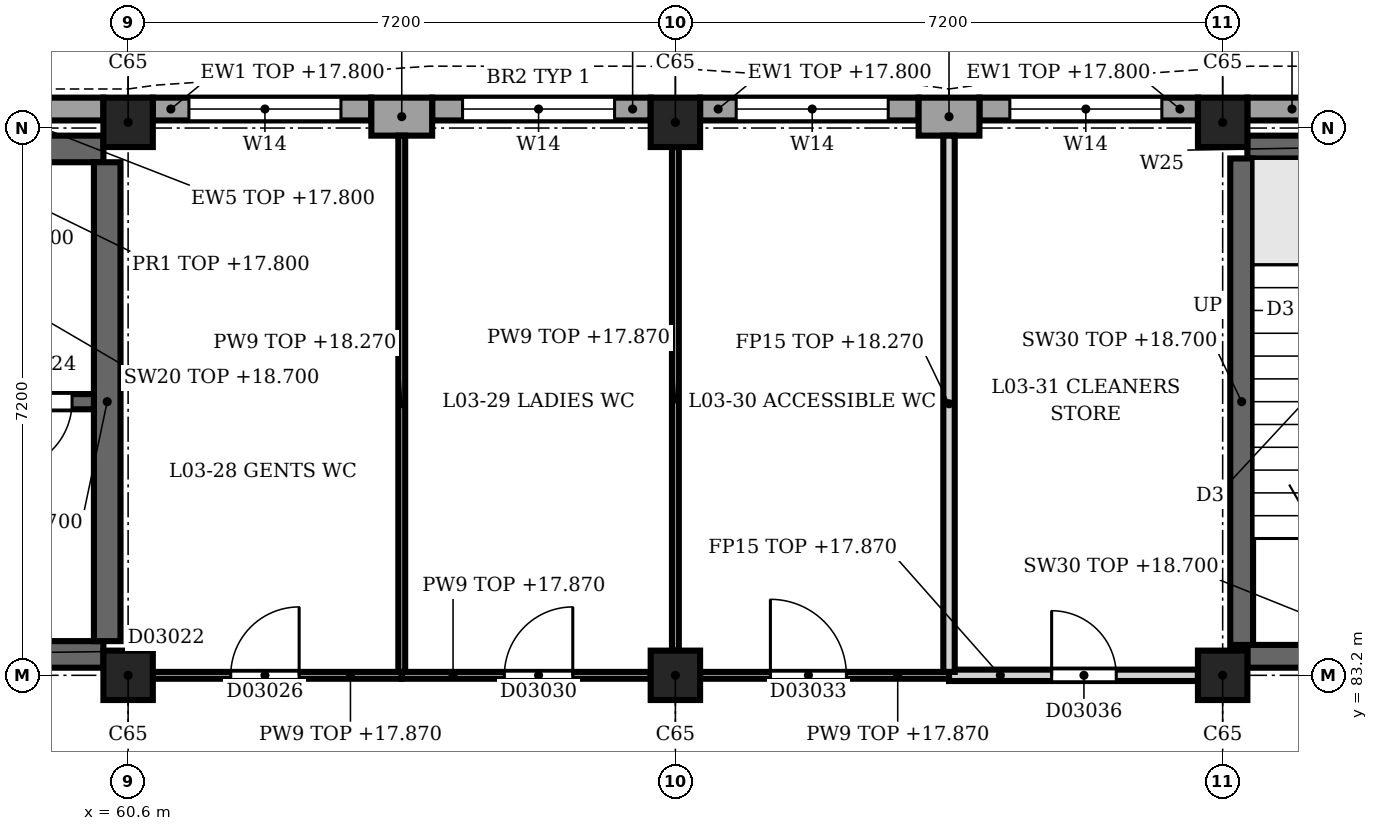
"""IFC4 building model, lengths in metres.
Left out: names, types, materials, properties, quantities, classifications, styles, units other than length and angle.
Written with IfcOpenShell. Run it as: python <this file> out.ifc"""

import sys

from ifc_helpers import new_model, si_unit, direction, frame, frame_2d, origin, origin_2d, place, context, subcontext, project, spatial, rectangle, extrude, element, fill, save


model = new_model("IFC4")
c1 = context("Model", 3, precision=1e-05, world=origin(), true_north=direction((0.0, 1.0)))
c2 = subcontext(c1, "Body", "Model", "MODEL_VIEW")
j1 = project(units=[si_unit("LENGTHUNIT", "METRE"), si_unit("PLANEANGLEUNIT", "RADIAN")], contexts=[c1])
p1 = place(None, origin())
s1 = spatial("IfcSite", under=j1, at=p1, CompositionType="ELEMENT")
p2 = place(p1, origin())
s2 = spatial("IfcBuilding", under=s1, at=p2, CompositionType="ELEMENT")
p3 = place(p2, frame((0.0, 0.0, 14.4)))
s3 = spatial("IfcBuildingStorey", under=s2, at=p3, CompositionType="ELEMENT", Elevation=14.4)
for number, where, z_axis, x_axis in (
    (1, (60.6, 83.2, 0.0), (0.0, 0.0, 1.0), (1.0, 0.0, 0.0)),
    (2, (60.6, 90.475, 0.0), (0.0, 0.0, 1.0), (1.0, 0.0, 0.0)),
    (3, (67.8, 83.2, 0.0), (0.0, 0.0, 1.0), (1.0, 0.0, 0.0)),
    (4, (67.8, 90.475, 0.0), (0.0, 0.0, 1.0), (1.0, 0.0, 0.0)),
    (5, (75.0, 83.2, 0.0), (0.0, 0.0, 1.0), (1.0, 0.0, 0.0)),
    (6, (75.0, 90.475, 0.0), (0.0, 0.0, 1.0), (1.0, 0.0, 0.0)),
):
    element("IfcColumn", number, at=place(p3, frame(where, z_axis=z_axis, x_axis=x_axis)), inside=s3, PredefinedType="COLUMN", context=c2, shape_type="SweptSolid", body=[
        extrude(rectangle(XDim=0.65, YDim=0.65, at=origin_2d()), origin(), (0.0, 0.0, 1.0), 4.5),
    ])
for number, where, z_axis, x_axis in (
    (7, (63.8, 90.55, 0.0), (0.0, 0.0, 1.0), (1.0, 0.0, 0.0)),
    (8, (71.0, 90.55, 0.0), (0.0, 0.0, 1.0), (1.0, 0.0, 0.0)),
):
    element("IfcWall", number, at=place(p3, frame(where, z_axis=z_axis, x_axis=x_axis)), inside=s3, PredefinedType="SOLIDWALL", context=c2, shape_type="SweptSolid", body=[
        extrude(rectangle(XDim=0.8, YDim=0.5, at=frame_2d((0.4, 0.0))), origin(), (0.0, 0.0, 1.0), 3.4),
    ])
p4 = place(p3, frame((57.4, 90.65, 0.0), z_axis=(0.0, 0.0, 1.0), x_axis=(1.0, 0.0, 0.0)))
e9 = element("IfcWall", 9, at=p4, inside=s3, PredefinedType="SOLIDWALL", context=c2, shape_type="SweptSolid", body=[
    extrude(rectangle(XDim=2.875, YDim=0.3, at=frame_2d((1.438, 0.0))), origin(), (0.0, 0.0, 1.0), 3.4),
])
p5 = place(p3, frame((60.925, 90.65, 0.0), z_axis=(0.0, 0.0, 1.0), x_axis=(1.0, 0.0, 0.0)))
e10 = element("IfcWall", 10, at=p5, inside=s3, PredefinedType="SOLIDWALL", context=c2, shape_type="SweptSolid", body=[
    extrude(rectangle(XDim=2.875, YDim=0.3, at=frame_2d((1.438, 0.0))), origin(), (0.0, 0.0, 1.0), 3.4),
])
p6 = place(p5, frame((0.475, 0.0, 0.9)))
e11 = element("IfcOpeningElement", 11, at=p6, cuts=e10, PredefinedType="OPENING", context=c2, shape_type="SweptSolid", body=[
    extrude(rectangle(XDim=2.0, YDim=2.4, at=frame_2d((1.0, 1.2))), frame((0.0, 0.16, 0.0), z_axis=(0.0, -1.0, 0.0), x_axis=(1.0, 0.0, 0.0)), (0.0, 0.0, 1.0), 0.32),
])
p7 = place(p3, frame((64.6, 90.65, 0.0), z_axis=(0.0, 0.0, 1.0), x_axis=(1.0, 0.0, 0.0)))
e12 = element("IfcWall", 12, at=p7, inside=s3, PredefinedType="SOLIDWALL", context=c2, shape_type="SweptSolid", body=[
    extrude(rectangle(XDim=2.875, YDim=0.3, at=frame_2d((1.438, 0.0))), origin(), (0.0, 0.0, 1.0), 3.4),
])
p8 = place(p7, frame((0.4, 0.0, 0.9)))
e13 = element("IfcOpeningElement", 13, at=p8, cuts=e12, PredefinedType="OPENING", context=c2, shape_type="SweptSolid", body=[
    extrude(rectangle(XDim=2.0, YDim=2.4, at=frame_2d((1.0, 1.2))), frame((0.0, 0.16, 0.0), z_axis=(0.0, -1.0, 0.0), x_axis=(1.0, 0.0, 0.0)), (0.0, 0.0, 1.0), 0.32),
])
p9 = place(p3, frame((68.125, 90.65, 0.0), z_axis=(0.0, 0.0, 1.0), x_axis=(1.0, 0.0, 0.0)))
e14 = element("IfcWall", 14, at=p9, inside=s3, PredefinedType="SOLIDWALL", context=c2, shape_type="SweptSolid", body=[
    extrude(rectangle(XDim=2.875, YDim=0.3, at=frame_2d((1.438, 0.0))), origin(), (0.0, 0.0, 1.0), 3.4),
])
p10 = place(p9, frame((0.475, 0.0, 0.9)))
e15 = element("IfcOpeningElement", 15, at=p10, cuts=e14, PredefinedType="OPENING", context=c2, shape_type="SweptSolid", body=[
    extrude(rectangle(XDim=2.0, YDim=2.4, at=frame_2d((1.0, 1.2))), frame((0.0, 0.16, 0.0), z_axis=(0.0, -1.0, 0.0), x_axis=(1.0, 0.0, 0.0)), (0.0, 0.0, 1.0), 0.32),
])
p11 = place(p3, frame((71.8, 90.65, 0.0), z_axis=(0.0, 0.0, 1.0), x_axis=(1.0, 0.0, 0.0)))
e16 = element("IfcWall", 16, at=p11, inside=s3, PredefinedType="SOLIDWALL", context=c2, shape_type="SweptSolid", body=[
    extrude(rectangle(XDim=2.875, YDim=0.3, at=frame_2d((1.438, 0.0))), origin(), (0.0, 0.0, 1.0), 3.4),
])
p12 = place(p11, frame((0.4, 0.0, 0.9)))
e17 = element("IfcOpeningElement", 17, at=p12, cuts=e16, PredefinedType="OPENING", context=c2, shape_type="SweptSolid", body=[
    extrude(rectangle(XDim=2.0, YDim=2.4, at=frame_2d((1.0, 1.2))), frame((0.0, 0.16, 0.0), z_axis=(0.0, -1.0, 0.0), x_axis=(1.0, 0.0, 0.0)), (0.0, 0.0, 1.0), 0.32),
])
p13 = place(p3, frame((75.325, 90.65, 0.0), z_axis=(0.0, 0.0, 1.0), x_axis=(1.0, 0.0, 0.0)))
e18 = element("IfcWall", 18, at=p13, inside=s3, PredefinedType="SOLIDWALL", context=c2, shape_type="SweptSolid", body=[
    extrude(rectangle(XDim=2.875, YDim=0.3, at=frame_2d((1.438, 0.0))), origin(), (0.0, 0.0, 1.0), 3.4),
])
p14 = place(p13, frame((1.175, 0.0, 1.2)))
e19 = element("IfcOpeningElement", 19, at=p14, cuts=e18, PredefinedType="OPENING", context=c2, shape_type="SweptSolid", body=[
    extrude(rectangle(XDim=0.6, YDim=1.8, at=frame_2d((0.3, 0.9))), frame((0.0, 0.16, 0.0), z_axis=(0.0, -1.0, 0.0), x_axis=(1.0, 0.0, 0.0)), (0.0, 0.0, 1.0), 0.32),
])
p15 = place(p3, frame((53.725, 83.475, 0.0), z_axis=(0.0, 0.0, 1.0), x_axis=(1.0, 0.0, 0.0)))
e20 = element("IfcWall", 20, at=p15, inside=s3, PredefinedType="SHEAR", context=c2, shape_type="SweptSolid", body=[
    extrude(rectangle(XDim=6.55, YDim=0.35, at=frame_2d((3.275, 0.0))), origin(), (0.0, 0.0, 1.0), 4.3),
])
p16 = place(p15, frame((2.675, 0.0, 0.0)))
e21 = element("IfcOpeningElement", 21, at=p16, cuts=e20, PredefinedType="OPENING", context=c2, shape_type="SweptSolid", body=[
    extrude(rectangle(XDim=1.8, YDim=2.1, at=frame_2d((0.9, 1.05))), frame((0.0, 0.185, 0.0), z_axis=(0.0, -1.0, 0.0), x_axis=(1.0, 0.0, 0.0)), (0.0, 0.0, 1.0), 0.37),
])
p17 = place(p3, frame((53.725, 90.125, 0.0), z_axis=(0.0, 0.0, 1.0), x_axis=(1.0, 0.0, 0.0)))
e22 = element("IfcWall", 22, at=p17, inside=s3, PredefinedType="SHEAR", context=c2, shape_type="SweptSolid", body=[
    extrude(rectangle(XDim=6.55, YDim=0.35, at=frame_2d((3.275, 0.0))), origin(), (0.0, 0.0, 1.0), 4.3),
])
p18 = place(p3, frame((60.325, 83.65, 0.0), z_axis=(0.0, 0.0, 1.0), x_axis=(0.0, 1.0, 0.0)))
e23 = element("IfcWall", 23, at=p18, inside=s3, PredefinedType="SHEAR", context=c2, shape_type="SweptSolid", body=[
    extrude(rectangle(XDim=6.3, YDim=0.35, at=frame_2d((3.15, 0.0))), origin(), (0.0, 0.0, 1.0), 4.3),
])
p19 = place(p3, frame((60.15, 86.8, 0.0), z_axis=(0.0, 0.0, 1.0), x_axis=(-1.0, 0.0, 0.0)))
e24 = element("IfcWall", 24, at=p19, inside=s3, PredefinedType="SHEAR", context=c2, shape_type="SweptSolid", body=[
    extrude(rectangle(XDim=10.35, YDim=0.2, at=frame_2d((5.175, 0.0))), origin(), (0.0, 0.0, 1.0), 4.3),
])
p20 = place(p19, frame((8.8, 0.0, 0.0)))
e25 = element("IfcOpeningElement", 25, at=p20, cuts=e24, PredefinedType="OPENING", context=c2, shape_type="SweptSolid", body=[
    extrude(rectangle(XDim=1.1, YDim=2.1, at=frame_2d((0.55, 1.05))), frame((0.0, 0.11, 0.0), z_axis=(0.0, -1.0, 0.0), x_axis=(1.0, 0.0, 0.0)), (0.0, 0.0, 1.0), 0.22),
])
p21 = place(p19, frame((6.6, 0.0, 0.0)))
e26 = element("IfcOpeningElement", 26, at=p21, cuts=e24, PredefinedType="OPENING", context=c2, shape_type="SweptSolid", body=[
    extrude(rectangle(XDim=1.1, YDim=2.1, at=frame_2d((0.55, 1.05))), frame((0.0, 0.11, 0.0), z_axis=(0.0, -1.0, 0.0), x_axis=(1.0, 0.0, 0.0)), (0.0, 0.0, 1.0), 0.22),
])
p22 = place(p19, frame((3.75, 0.0, 0.0)))
e27 = element("IfcOpeningElement", 27, at=p22, cuts=e24, PredefinedType="OPENING", context=c2, shape_type="SweptSolid", body=[
    extrude(rectangle(XDim=1.4, YDim=2.1, at=frame_2d((0.7, 1.05))), frame((0.0, 0.11, 0.0), z_axis=(0.0, -1.0, 0.0), x_axis=(1.0, 0.0, 0.0)), (0.0, 0.0, 1.0), 0.22),
])
p23 = place(p19, frame((1.962, 0.0, 0.0)))
e28 = element("IfcOpeningElement", 28, at=p23, cuts=e24, PredefinedType="OPENING", context=c2, shape_type="SweptSolid", body=[
    extrude(rectangle(XDim=0.9, YDim=2.1, at=frame_2d((0.45, 1.05))), frame((0.0, 0.11, 0.0), z_axis=(0.0, -1.0, 0.0), x_axis=(1.0, 0.0, 0.0)), (0.0, 0.0, 1.0), 0.22),
])
p24 = place(p19, frame((0.288, 0.0, 0.0)))
e29 = element("IfcOpeningElement", 29, at=p24, cuts=e24, PredefinedType="OPENING", context=c2, shape_type="SweptSolid", body=[
    extrude(rectangle(XDim=0.9, YDim=2.1, at=frame_2d((0.45, 1.05))), frame((0.0, 0.11, 0.0), z_axis=(0.0, -1.0, 0.0), x_axis=(1.0, 0.0, 0.0)), (0.0, 0.0, 1.0), 0.22),
])
p25 = place(p3, frame((75.325, 83.45, 0.0), z_axis=(0.0, 0.0, 1.0), x_axis=(1.0, 0.0, 0.0)))
e30 = element("IfcWall", 30, at=p25, inside=s3, PredefinedType="SHEAR", context=c2, shape_type="SweptSolid", body=[
    extrude(rectangle(XDim=6.625, YDim=0.3, at=frame_2d((3.312, 0.0))), origin(), (0.0, 0.0, 1.0), 4.3),
])
p26 = place(p25, frame((4.275, 0.0, 0.0)))
e31 = element("IfcOpeningElement", 31, at=p26, cuts=e30, PredefinedType="OPENING", context=c2, shape_type="SweptSolid", body=[
    extrude(rectangle(XDim=1.2, YDim=2.1, at=frame_2d((0.6, 1.05))), frame((0.0, 0.16, 0.0), z_axis=(0.0, -1.0, 0.0), x_axis=(1.0, 0.0, 0.0)), (0.0, 0.0, 1.0), 0.32),
])
p27 = place(p3, frame((75.325, 90.15, 0.0), z_axis=(0.0, 0.0, 1.0), x_axis=(1.0, 0.0, 0.0)))
e32 = element("IfcWall", 32, at=p27, inside=s3, PredefinedType="SHEAR", context=c2, shape_type="SweptSolid", body=[
    extrude(rectangle(XDim=6.625, YDim=0.3, at=frame_2d((3.312, 0.0))), origin(), (0.0, 0.0, 1.0), 4.3),
])
p28 = place(p27, frame((1.175, 0.0, 1.2)))
e33 = element("IfcOpeningElement", 33, at=p28, cuts=e32, PredefinedType="OPENING", context=c2, shape_type="SweptSolid", body=[
    extrude(rectangle(XDim=0.6, YDim=1.8, at=frame_2d((0.3, 0.9))), frame((0.0, 0.16, 0.0), z_axis=(0.0, -1.0, 0.0), x_axis=(1.0, 0.0, 0.0)), (0.0, 0.0, 1.0), 0.32),
])
p29 = place(p3, frame((75.25, 83.6, 0.0), z_axis=(0.0, 0.0, 1.0), x_axis=(0.0, 1.0, 0.0)))
e34 = element("IfcWall", 34, at=p29, inside=s3, PredefinedType="SHEAR", context=c2, shape_type="SweptSolid", body=[
    extrude(rectangle(XDim=6.4, YDim=0.3, at=frame_2d((3.2, 0.0))), origin(), (0.0, 0.0, 1.0), 4.3),
])
p30 = place(p3, frame((60.925, 83.2, 0.0), z_axis=(0.0, 0.0, 1.0), x_axis=(1.0, 0.0, 0.0)))
e35 = element("IfcWall", 35, at=p30, inside=s3, PredefinedType="PARTITIONING", context=c2, shape_type="SweptSolid", body=[
    extrude(rectangle(XDim=3.275, YDim=0.09, at=frame_2d((1.637, 0.0))), origin(), (0.0, 0.0, 1.0), 3.47),
])
p31 = place(p30, frame((1.025, 0.0, 0.0)))
e36 = element("IfcOpeningElement", 36, at=p31, cuts=e35, PredefinedType="OPENING", context=c2, shape_type="SweptSolid", body=[
    extrude(rectangle(XDim=0.9, YDim=2.1, at=frame_2d((0.45, 1.05))), frame((0.0, 0.055, 0.0), z_axis=(0.0, -1.0, 0.0), x_axis=(1.0, 0.0, 0.0)), (0.0, 0.0, 1.0), 0.11),
])
p32 = place(p3, frame((64.2, 83.2, 0.0), z_axis=(0.0, 0.0, 1.0), x_axis=(1.0, 0.0, 0.0)))
e37 = element("IfcWall", 37, at=p32, inside=s3, PredefinedType="PARTITIONING", context=c2, shape_type="SweptSolid", body=[
    extrude(rectangle(XDim=3.275, YDim=0.09, at=frame_2d((1.638, 0.0))), origin(), (0.0, 0.0, 1.0), 3.47),
])
p33 = place(p32, frame((1.35, 0.0, 0.0)))
e38 = element("IfcOpeningElement", 38, at=p33, cuts=e37, PredefinedType="OPENING", context=c2, shape_type="SweptSolid", body=[
    extrude(rectangle(XDim=0.9, YDim=2.1, at=frame_2d((0.45, 1.05))), frame((0.0, 0.055, 0.0), z_axis=(0.0, -1.0, 0.0), x_axis=(1.0, 0.0, 0.0)), (0.0, 0.0, 1.0), 0.11),
])
p34 = place(p3, frame((68.125, 83.2, 0.0), z_axis=(0.0, 0.0, 1.0), x_axis=(1.0, 0.0, 0.0)))
e39 = element("IfcWall", 39, at=p34, inside=s3, PredefinedType="PARTITIONING", context=c2, shape_type="SweptSolid", body=[
    extrude(rectangle(XDim=3.275, YDim=0.09, at=frame_2d((1.637, 0.0))), origin(), (0.0, 0.0, 1.0), 3.47),
])
p35 = place(p34, frame((0.925, 0.0, 0.0)))
e40 = element("IfcOpeningElement", 40, at=p35, cuts=e39, PredefinedType="OPENING", context=c2, shape_type="SweptSolid", body=[
    extrude(rectangle(XDim=1.0, YDim=2.2, at=frame_2d((0.5, 1.1))), frame((0.0, 0.055, 0.0), z_axis=(0.0, -1.0, 0.0), x_axis=(1.0, 0.0, 0.0)), (0.0, 0.0, 1.0), 0.11),
])
p36 = place(p3, frame((71.4, 83.2, 0.0), z_axis=(0.0, 0.0, 1.0), x_axis=(1.0, 0.0, 0.0)))
e41 = element("IfcWall", 41, at=p36, inside=s3, PredefinedType="PARTITIONING", context=c2, shape_type="SweptSolid", body=[
    extrude(rectangle(XDim=3.275, YDim=0.15, at=frame_2d((1.638, 0.0))), origin(), (0.0, 0.0, 1.0), 3.47),
])
p37 = place(p36, frame((1.35, 0.0, 0.0)))
e42 = element("IfcOpeningElement", 42, at=p37, cuts=e41, PredefinedType="OPENING", context=c2, shape_type="SweptSolid", body=[
    extrude(rectangle(XDim=0.85, YDim=2.1, at=frame_2d((0.425, 1.05))), frame((0.0, 0.085, 0.0), z_axis=(0.0, -1.0, 0.0), x_axis=(1.0, 0.0, 0.0)), (0.0, 0.0, 1.0), 0.17),
])
p38 = place(p3, frame((64.2, 83.245, 0.0), z_axis=(0.0, 0.0, 1.0), x_axis=(0.0, 1.0, 0.0)))
e43 = element("IfcWall", 43, at=p38, inside=s3, PredefinedType="PARTITIONING", context=c2, shape_type="SweptSolid", body=[
    extrude(rectangle(XDim=7.055, YDim=0.09, at=frame_2d((3.527, 0.0))), origin(), (0.0, 0.0, 1.0), 3.87),
])
p39 = place(p3, frame((67.8, 83.525, 0.0), z_axis=(0.0, 0.0, 1.0), x_axis=(0.0, 1.0, 0.0)))
e44 = element("IfcWall", 44, at=p39, inside=s3, PredefinedType="PARTITIONING", context=c2, shape_type="SweptSolid", body=[
    extrude(rectangle(XDim=6.625, YDim=0.09, at=frame_2d((3.312, 0.0))), origin(), (0.0, 0.0, 1.0), 3.47),
])
p40 = place(p3, frame((71.4, 83.245, 0.0), z_axis=(0.0, 0.0, 1.0), x_axis=(0.0, 1.0, 0.0)))
e45 = element("IfcWall", 45, at=p40, inside=s3, PredefinedType="PARTITIONING", context=c2, shape_type="SweptSolid", body=[
    extrude(rectangle(XDim=7.055, YDim=0.15, at=frame_2d((3.527, 0.0))), origin(), (0.0, 0.0, 1.0), 3.87),
])
p41 = place(p6, origin())
e46 = element("IfcWindow", 46, at=p41, inside=s3, PartitioningType="SINGLE_PANEL", PredefinedType="WINDOW", context=c2, shape_type="SweptSolid", body=[
    extrude(rectangle(XDim=2.0, YDim=2.4, at=frame_2d((1.0, 1.2))), frame((0.0, 0.03, 0.0), z_axis=(0.0, -1.0, 0.0), x_axis=(1.0, 0.0, 0.0)), (0.0, 0.0, 1.0), 0.06),
])
fill(e11, e46)
p42 = place(p8, origin())
e47 = element("IfcWindow", 47, at=p42, inside=s3, PartitioningType="SINGLE_PANEL", PredefinedType="WINDOW", context=c2, shape_type="SweptSolid", body=[
    extrude(rectangle(XDim=2.0, YDim=2.4, at=frame_2d((1.0, 1.2))), frame((0.0, 0.03, 0.0), z_axis=(0.0, -1.0, 0.0), x_axis=(1.0, 0.0, 0.0)), (0.0, 0.0, 1.0), 0.06),
])
fill(e13, e47)
p43 = place(p10, origin())
e48 = element("IfcWindow", 48, at=p43, inside=s3, PartitioningType="SINGLE_PANEL", PredefinedType="WINDOW", context=c2, shape_type="SweptSolid", body=[
    extrude(rectangle(XDim=2.0, YDim=2.4, at=frame_2d((1.0, 1.2))), frame((0.0, 0.03, 0.0), z_axis=(0.0, -1.0, 0.0), x_axis=(1.0, 0.0, 0.0)), (0.0, 0.0, 1.0), 0.06),
])
fill(e15, e48)
p44 = place(p12, origin())
e49 = element("IfcWindow", 49, at=p44, inside=s3, PartitioningType="SINGLE_PANEL", PredefinedType="WINDOW", context=c2, shape_type="SweptSolid", body=[
    extrude(rectangle(XDim=2.0, YDim=2.4, at=frame_2d((1.0, 1.2))), frame((0.0, 0.03, 0.0), z_axis=(0.0, -1.0, 0.0), x_axis=(1.0, 0.0, 0.0)), (0.0, 0.0, 1.0), 0.06),
])
fill(e17, e49)
p45 = place(p24, origin())
e50 = element("IfcDoor", 50, at=p45, inside=s3, OperationType="SINGLE_SWING_LEFT", PredefinedType="DOOR", context=c2, shape_type="SweptSolid", body=[
    extrude(rectangle(XDim=0.9, YDim=2.1, at=frame_2d((0.45, 1.05))), frame((0.0, 0.025, 0.0), z_axis=(0.0, -1.0, 0.0), x_axis=(1.0, 0.0, 0.0)), (0.0, 0.0, 1.0), 0.05),
])
fill(e29, e50)
p46 = place(p31, origin())
e51 = element("IfcDoor", 51, at=p46, inside=s3, OperationType="SINGLE_SWING_LEFT", PredefinedType="DOOR", context=c2, shape_type="SweptSolid", body=[
    extrude(rectangle(XDim=0.9, YDim=2.1, at=frame_2d((0.45, 1.05))), frame((0.0, 0.025, 0.0), z_axis=(0.0, -1.0, 0.0), x_axis=(1.0, 0.0, 0.0)), (0.0, 0.0, 1.0), 0.05),
])
fill(e36, e51)
p47 = place(p33, origin())
e52 = element("IfcDoor", 52, at=p47, inside=s3, OperationType="SINGLE_SWING_RIGHT", PredefinedType="DOOR", context=c2, shape_type="SweptSolid", body=[
    extrude(rectangle(XDim=0.9, YDim=2.1, at=frame_2d((0.45, 1.05))), frame((0.0, 0.025, 0.0), z_axis=(0.0, -1.0, 0.0), x_axis=(1.0, 0.0, 0.0)), (0.0, 0.0, 1.0), 0.05),
])
fill(e38, e52)
p48 = place(p35, origin())
e53 = element("IfcDoor", 53, at=p48, inside=s3, OperationType="SINGLE_SWING_LEFT", PredefinedType="DOOR", context=c2, shape_type="SweptSolid", body=[
    extrude(rectangle(XDim=1.0, YDim=2.2, at=frame_2d((0.5, 1.1))), frame((0.0, 0.025, 0.0), z_axis=(0.0, -1.0, 0.0), x_axis=(1.0, 0.0, 0.0)), (0.0, 0.0, 1.0), 0.05),
])
fill(e40, e53)
p49 = place(p37, origin())
e54 = element("IfcDoor", 54, at=p49, inside=s3, OperationType="SINGLE_SWING_RIGHT", PredefinedType="DOOR", context=c2, shape_type="SweptSolid", body=[
    extrude(rectangle(XDim=0.85, YDim=2.1, at=frame_2d((0.425, 1.05))), frame((0.0, 0.025, 0.0), z_axis=(0.0, -1.0, 0.0), x_axis=(1.0, 0.0, 0.0)), (0.0, 0.0, 1.0), 0.05),
])
fill(e42, e54)
save(model, sys.argv[1])
